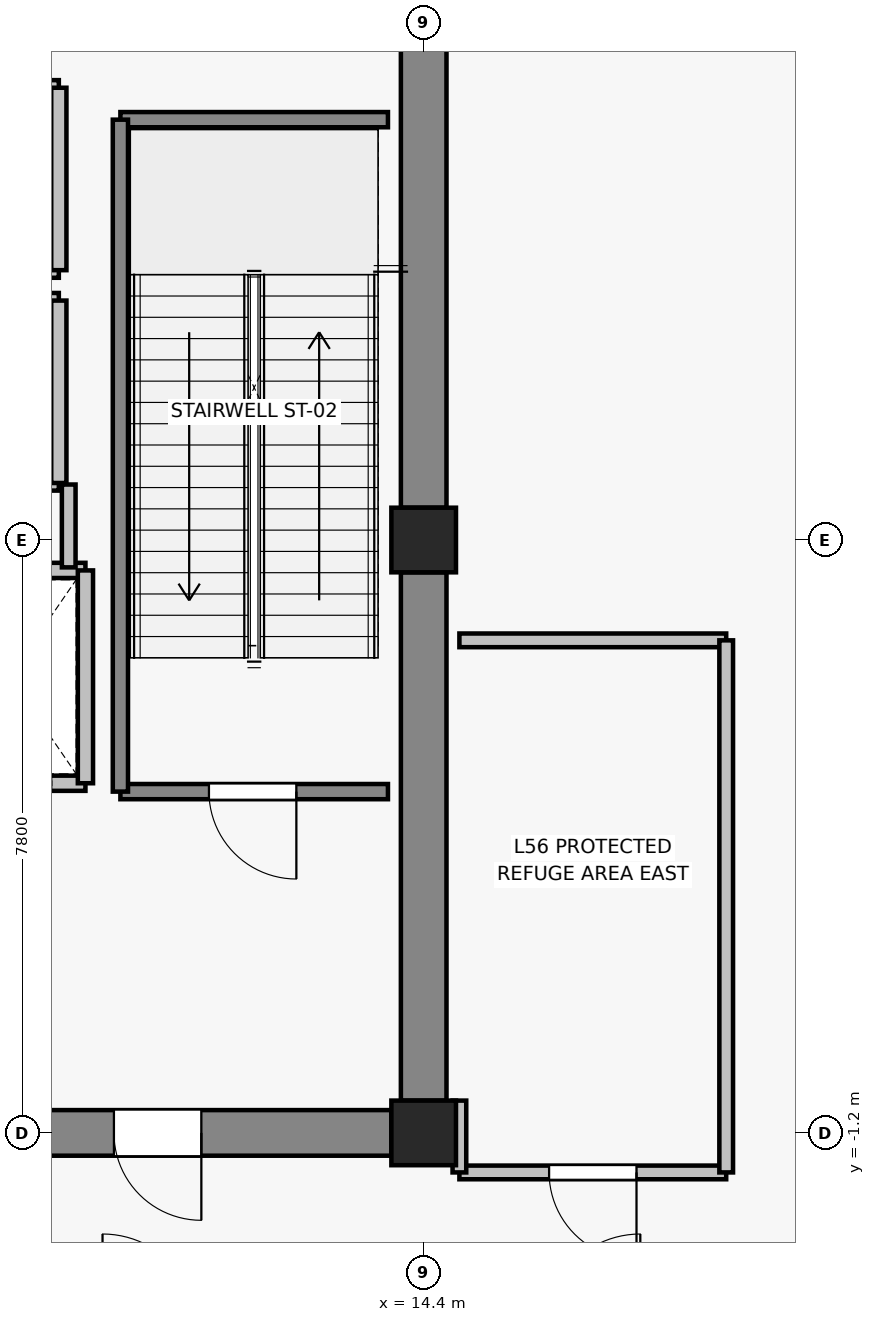
"""IFC4 building model, lengths in metres.
Left out: names, types, materials, properties, quantities, classifications, styles, units other than length and angle.
Written with IfcOpenShell. Run it as: python <this file> out.ifc"""

import sys

from ifc_helpers import new_model, si_unit, direction, frame, frame_2d, origin, origin_2d, place, context, subcontext, project, spatial, rectangle, extrude, source, transform, mapped, element, fill, save


model = new_model("IFC4")
c1 = context("Model", 3, precision=1e-05, world=origin(), true_north=direction((0.0, 1.0)))
c2 = subcontext(c1, "Body", "Model", "MODEL_VIEW")
j1 = project(units=[si_unit("LENGTHUNIT", "METRE"), si_unit("PLANEANGLEUNIT", "RADIAN")], contexts=[c1])
p1 = place(None, origin())
s1 = spatial("IfcSite", under=j1, at=p1, CompositionType="ELEMENT")
p2 = place(p1, origin())
s2 = spatial("IfcBuilding", under=s1, at=p2, CompositionType="ELEMENT")
p3 = place(p2, frame((0.0, 0.0, 199.0)))
s3 = spatial("IfcBuildingStorey", under=s2, at=p3, CompositionType="ELEMENT", Elevation=199.0)
for number, where, z_axis, x_axis in (
    (1, (14.4, -1.2, 0.0), (0.0, 0.0, 1.0), (1.0, 0.0, 0.0)),
    (2, (14.4, 6.6, 0.0), (0.0, 0.0, 1.0), (1.0, 0.0, 0.0)),
):
    element("IfcColumn", number, at=place(p3, frame(where, z_axis=z_axis, x_axis=x_axis)), inside=s3, PredefinedType="COLUMN", context=c2, shape_type="SweptSolid", body=[
        extrude(rectangle(XDim=0.85, YDim=0.85, at=origin_2d()), origin(), (0.0, 0.0, 1.0), 6.6),
    ])
p4 = place(p3, frame((14.4, -0.775, 0.0), z_axis=(0.0, 0.0, 1.0), x_axis=(0.0, 1.0, 0.0)))
e3 = element("IfcWall", 3, at=p4, inside=s3, PredefinedType="SHEAR", context=c2, shape_type="SweptSolid", body=[
    extrude(rectangle(XDim=6.95, YDim=0.6, at=frame_2d((3.475, 0.0))), origin(), (0.0, 0.0, 1.0), 6.35),
])
p5 = place(p3, frame((14.4, 7.025, 0.0), z_axis=(0.0, 0.0, 1.0), x_axis=(0.0, 1.0, 0.0)))
e4 = element("IfcWall", 4, at=p5, inside=s3, PredefinedType="SHEAR", context=c2, shape_type="SweptSolid", body=[
    extrude(rectangle(XDim=6.05, YDim=0.6, at=frame_2d((3.025, 0.0))), origin(), (0.0, 0.0, 1.0), 6.35),
])
p6 = place(p3, frame((13.975, -1.2, 0.0), z_axis=(0.0, 0.0, 1.0), x_axis=(-1.0, 0.0, 0.0)))
e5 = element("IfcWall", 5, at=p6, inside=s3, PredefinedType="SHEAR", context=c2, shape_type="SweptSolid", body=[
    extrude(rectangle(XDim=6.35, YDim=0.6, at=frame_2d((3.175, 0.0))), origin(), (0.0, 0.0, 1.0), 6.35),
])
p7 = place(p6, frame((2.5, 0.0, 0.0)))
e6 = element("IfcOpeningElement", 6, at=p7, cuts=e5, PredefinedType="OPENING", context=c2, shape_type="SweptSolid", body=[
    extrude(rectangle(XDim=1.15, YDim=2.15, at=frame_2d((0.575, 1.075))), frame((0.0, 0.31, 0.0), z_axis=(0.0, -1.0, 0.0), x_axis=(1.0, 0.0, 0.0)), (0.0, 0.0, 1.0), 0.62),
])
p8 = place(p3, frame((9.95, 3.4, 0.0), z_axis=(0.0, 0.0, 1.0), x_axis=(-1.0, 0.0, 0.0)))
e7 = element("IfcWall", 7, at=p8, inside=s3, PredefinedType="SOLIDWALL", context=c2, shape_type="SweptSolid", body=[
    extrude(rectangle(XDim=2.0, YDim=0.2, at=frame_2d((1.0, 0.0))), origin(), (0.0, 0.0, 1.0), 6.35),
])
p9 = place(p8, frame((0.45, 0.0, 0.0)))
e8 = element("IfcOpeningElement", 8, at=p9, cuts=e7, PredefinedType="OPENING", context=c2, shape_type="SweptSolid", body=[
    extrude(rectangle(XDim=1.1, YDim=2.2, at=frame_2d((0.55, 1.1))), frame((0.0, 0.11, 0.0), z_axis=(0.0, -1.0, 0.0), x_axis=(1.0, 0.0, 0.0)), (0.0, 0.0, 1.0), 0.22),
])
p10 = place(p3, frame((7.95, 6.2, 0.0), z_axis=(0.0, 0.0, 1.0), x_axis=(1.0, 0.0, 0.0)))
e9 = element("IfcWall", 9, at=p10, inside=s3, PredefinedType="SOLIDWALL", context=c2, shape_type="SweptSolid", body=[
    extrude(rectangle(XDim=2.0, YDim=0.2, at=frame_2d((1.0, 0.0))), origin(), (0.0, 0.0, 1.0), 6.35),
])
p11 = place(p3, frame((9.95, 6.2, 0.0), z_axis=(0.0, 0.0, 1.0), x_axis=(0.0, -1.0, 0.0)))
e10 = element("IfcWall", 10, at=p11, inside=s3, PredefinedType="SOLIDWALL", context=c2, shape_type="SweptSolid", body=[
    extrude(rectangle(XDim=2.8, YDim=0.2, at=frame_2d((1.4, 0.0))), origin(), (0.0, 0.0, 1.0), 6.35),
])
for number, where, z_axis, x_axis in (
    (11, (9.6, 7.35, 0.0), (0.0, 0.0, 1.0), (-1.0, 0.0, 0.0)),
    (12, (7.4, 9.75, 0.0), (0.0, 0.0, 1.0), (1.0, 0.0, 0.0)),
):
    element("IfcWall", number, at=place(p3, frame(where, z_axis=z_axis, x_axis=x_axis)), inside=s3, PredefinedType="SOLIDWALL", context=c2, shape_type="SweptSolid", body=[
        extrude(rectangle(XDim=2.2, YDim=0.2, at=frame_2d((1.1, 0.0))), origin(), (0.0, 0.0, 1.0), 5.89),
    ])
p12 = place(p3, frame((9.6, 9.75, 0.0), z_axis=(0.0, 0.0, 1.0), x_axis=(0.0, -1.0, 0.0)))
e13 = element("IfcWall", 13, at=p12, inside=s3, PredefinedType="SOLIDWALL", context=c2, shape_type="SweptSolid", body=[
    extrude(rectangle(XDim=2.4, YDim=0.2, at=frame_2d((1.2, 0.0))), origin(), (0.0, 0.0, 1.0), 6.35),
])
for number, where, z_axis, x_axis in (
    (14, (9.6, 10.15, 0.0), (0.0, 0.0, 1.0), (-1.0, 0.0, 0.0)),
    (15, (7.4, 12.55, 0.0), (0.0, 0.0, 1.0), (1.0, 0.0, 0.0)),
):
    element("IfcWall", number, at=place(p3, frame(where, z_axis=z_axis, x_axis=x_axis)), inside=s3, PredefinedType="SOLIDWALL", context=c2, shape_type="SweptSolid", body=[
        extrude(rectangle(XDim=2.2, YDim=0.2, at=frame_2d((1.1, 0.0))), origin(), (0.0, 0.0, 1.0), 5.89),
    ])
p13 = place(p3, frame((9.6, 12.55, 0.0), z_axis=(0.0, 0.0, 1.0), x_axis=(0.0, -1.0, 0.0)))
e16 = element("IfcWall", 16, at=p13, inside=s3, PredefinedType="SOLIDWALL", context=c2, shape_type="SweptSolid", body=[
    extrude(rectangle(XDim=2.4, YDim=0.2, at=frame_2d((1.2, 0.0))), origin(), (0.0, 0.0, 1.0), 6.35),
])
p14 = place(p3, frame((13.93, 3.29, 0.0), z_axis=(0.0, 0.0, 1.0), x_axis=(-1.0, 0.0, 0.0)))
e17 = element("IfcWall", 17, at=p14, inside=s3, PredefinedType="SOLIDWALL", context=c2, shape_type="SweptSolid", body=[
    extrude(rectangle(XDim=3.52, YDim=0.2, at=frame_2d((1.76, 0.0))), origin(), (0.0, 0.0, 1.0), 6.35),
])
p15 = place(p14, frame((1.205, 0.0, 0.0)))
e18 = element("IfcOpeningElement", 18, at=p15, cuts=e17, PredefinedType="OPENING", context=c2, shape_type="SweptSolid", body=[
    extrude(rectangle(XDim=1.15, YDim=2.15, at=frame_2d((0.575, 1.075))), frame((0.0, 0.11, 0.0), z_axis=(0.0, -1.0, 0.0), x_axis=(1.0, 0.0, 0.0)), (0.0, 0.0, 1.0), 0.22),
])
p16 = place(p3, frame((10.41, 12.13, 0.0), z_axis=(0.0, 0.0, 1.0), x_axis=(1.0, 0.0, 0.0)))
e19 = element("IfcWall", 19, at=p16, inside=s3, PredefinedType="SOLIDWALL", context=c2, shape_type="SweptSolid", body=[
    extrude(rectangle(XDim=3.52, YDim=0.2, at=frame_2d((1.76, 0.0))), origin(), (0.0, 0.0, 1.0), 6.35),
])
p17 = place(p3, frame((10.41, 3.29, 0.0), z_axis=(0.0, 0.0, 1.0), x_axis=(0.0, 1.0, 0.0)))
e20 = element("IfcWall", 20, at=p17, inside=s3, PredefinedType="SOLIDWALL", context=c2, shape_type="SweptSolid", body=[
    extrude(rectangle(XDim=8.84, YDim=0.2, at=frame_2d((4.42, 0.0))), origin(), (0.0, 0.0, 1.0), 6.35),
])
p18 = place(p3, frame((9.73, 7.33, 0.0), z_axis=(0.0, 0.0, 1.0), x_axis=(0.0, -1.0, 0.0)))
e21 = element("IfcWall", 21, at=p18, inside=s3, PredefinedType="PARTITIONING", context=c2, shape_type="SweptSolid", body=[
    extrude(rectangle(XDim=1.09, YDim=0.18, at=frame_2d((0.545, 0.0))), origin(), (0.0, 0.0, 1.0), 6.35),
])
p19 = place(p3, frame((18.38, -1.72, 0.0), z_axis=(0.0, 0.0, 1.0), x_axis=(-1.0, 0.0, 0.0)))
e22 = element("IfcWall", 22, at=p19, inside=s3, PredefinedType="PARTITIONING", context=c2, shape_type="SweptSolid", body=[
    extrude(rectangle(XDim=3.51, YDim=0.18, at=frame_2d((1.755, 0.0))), origin(), (0.0, 0.0, 1.0), 6.35),
])
p20 = place(p19, frame((1.18, 0.0, 0.0)))
e23 = element("IfcOpeningElement", 23, at=p20, cuts=e22, PredefinedType="OPENING", context=c2, shape_type="SweptSolid", body=[
    extrude(rectangle(XDim=1.15, YDim=2.15, at=frame_2d((0.575, 1.075))), frame((0.0, 0.1, 0.0), z_axis=(0.0, -1.0, 0.0), x_axis=(1.0, 0.0, 0.0)), (0.0, 0.0, 1.0), 0.2),
])
p21 = place(p3, frame((14.87, 5.28, 0.0), z_axis=(0.0, 0.0, 1.0), x_axis=(1.0, 0.0, 0.0)))
e24 = element("IfcWall", 24, at=p21, inside=s3, PredefinedType="PARTITIONING", context=c2, shape_type="SweptSolid", body=[
    extrude(rectangle(XDim=3.51, YDim=0.18, at=frame_2d((1.755, 0.0))), origin(), (0.0, 0.0, 1.0), 6.35),
])
p22 = place(p3, frame((14.87, -1.72, 0.0), z_axis=(0.0, 0.0, 1.0), x_axis=(0.0, 1.0, 0.0)))
e25 = element("IfcWall", 25, at=p22, inside=s3, PredefinedType="PARTITIONING", context=c2, shape_type="SweptSolid", body=[
    extrude(rectangle(XDim=0.945, YDim=0.18, at=frame_2d((0.473, 0.0))), origin(), (0.0, 0.0, 1.0), 4.89),
])
p23 = place(p3, frame((18.38, 5.28, 0.0), z_axis=(0.0, 0.0, 1.0), x_axis=(0.0, -1.0, 0.0)))
e26 = element("IfcWall", 26, at=p23, inside=s3, PredefinedType="PARTITIONING", context=c2, shape_type="SweptSolid", body=[
    extrude(rectangle(XDim=7.0, YDim=0.18, at=frame_2d((3.5, 0.0))), origin(), (0.0, 0.0, 1.0), 4.89),
])
m1 = source(origin(), c2, "Body", "SweptSolid", [
    extrude(rectangle(XDim=1.15, YDim=2.15, at=frame_2d((0.575, 1.075))), frame((0.0, 0.025, 0.0), z_axis=(0.0, -1.0, 0.0), x_axis=(1.0, 0.0, 0.0)), (0.0, 0.0, 1.0), 0.05),
])
p24 = place(p15, origin())
e27 = element("IfcDoor", 27, at=p24, inside=s3, OperationType="SINGLE_SWING_LEFT", PredefinedType="DOOR", context=c2, shape_type="MappedRepresentation", body=[
    mapped(m1, transform((0.0, 0.0, 0.0), x_axis=(1.0, 0.0, 0.0), y_axis=(0.0, 1.0, 0.0), z_axis=(0.0, 0.0, 1.0), scale=1.0)),
])
fill(e18, e27)
p25 = place(p7, origin())
e28 = element("IfcDoor", 28, at=p25, inside=s3, OperationType="SINGLE_SWING_LEFT", PredefinedType="DOOR", context=c2, shape_type="MappedRepresentation", body=[
    mapped(m1, transform((0.0, 0.0, 0.0), x_axis=(1.0, 0.0, 0.0), y_axis=(0.0, 1.0, 0.0), z_axis=(0.0, 0.0, 1.0), scale=1.0)),
])
fill(e6, e28)
p26 = place(p20, origin())
e29 = element("IfcDoor", 29, at=p26, inside=s3, OperationType="SINGLE_SWING_LEFT", PredefinedType="DOOR", context=c2, shape_type="MappedRepresentation", body=[
    mapped(m1, transform((0.0, 0.0, 0.0), x_axis=(1.0, 0.0, 0.0), y_axis=(0.0, 1.0, 0.0), z_axis=(0.0, 0.0, 1.0), scale=1.0)),
])
fill(e23, e29)
save(model, sys.argv[1])
